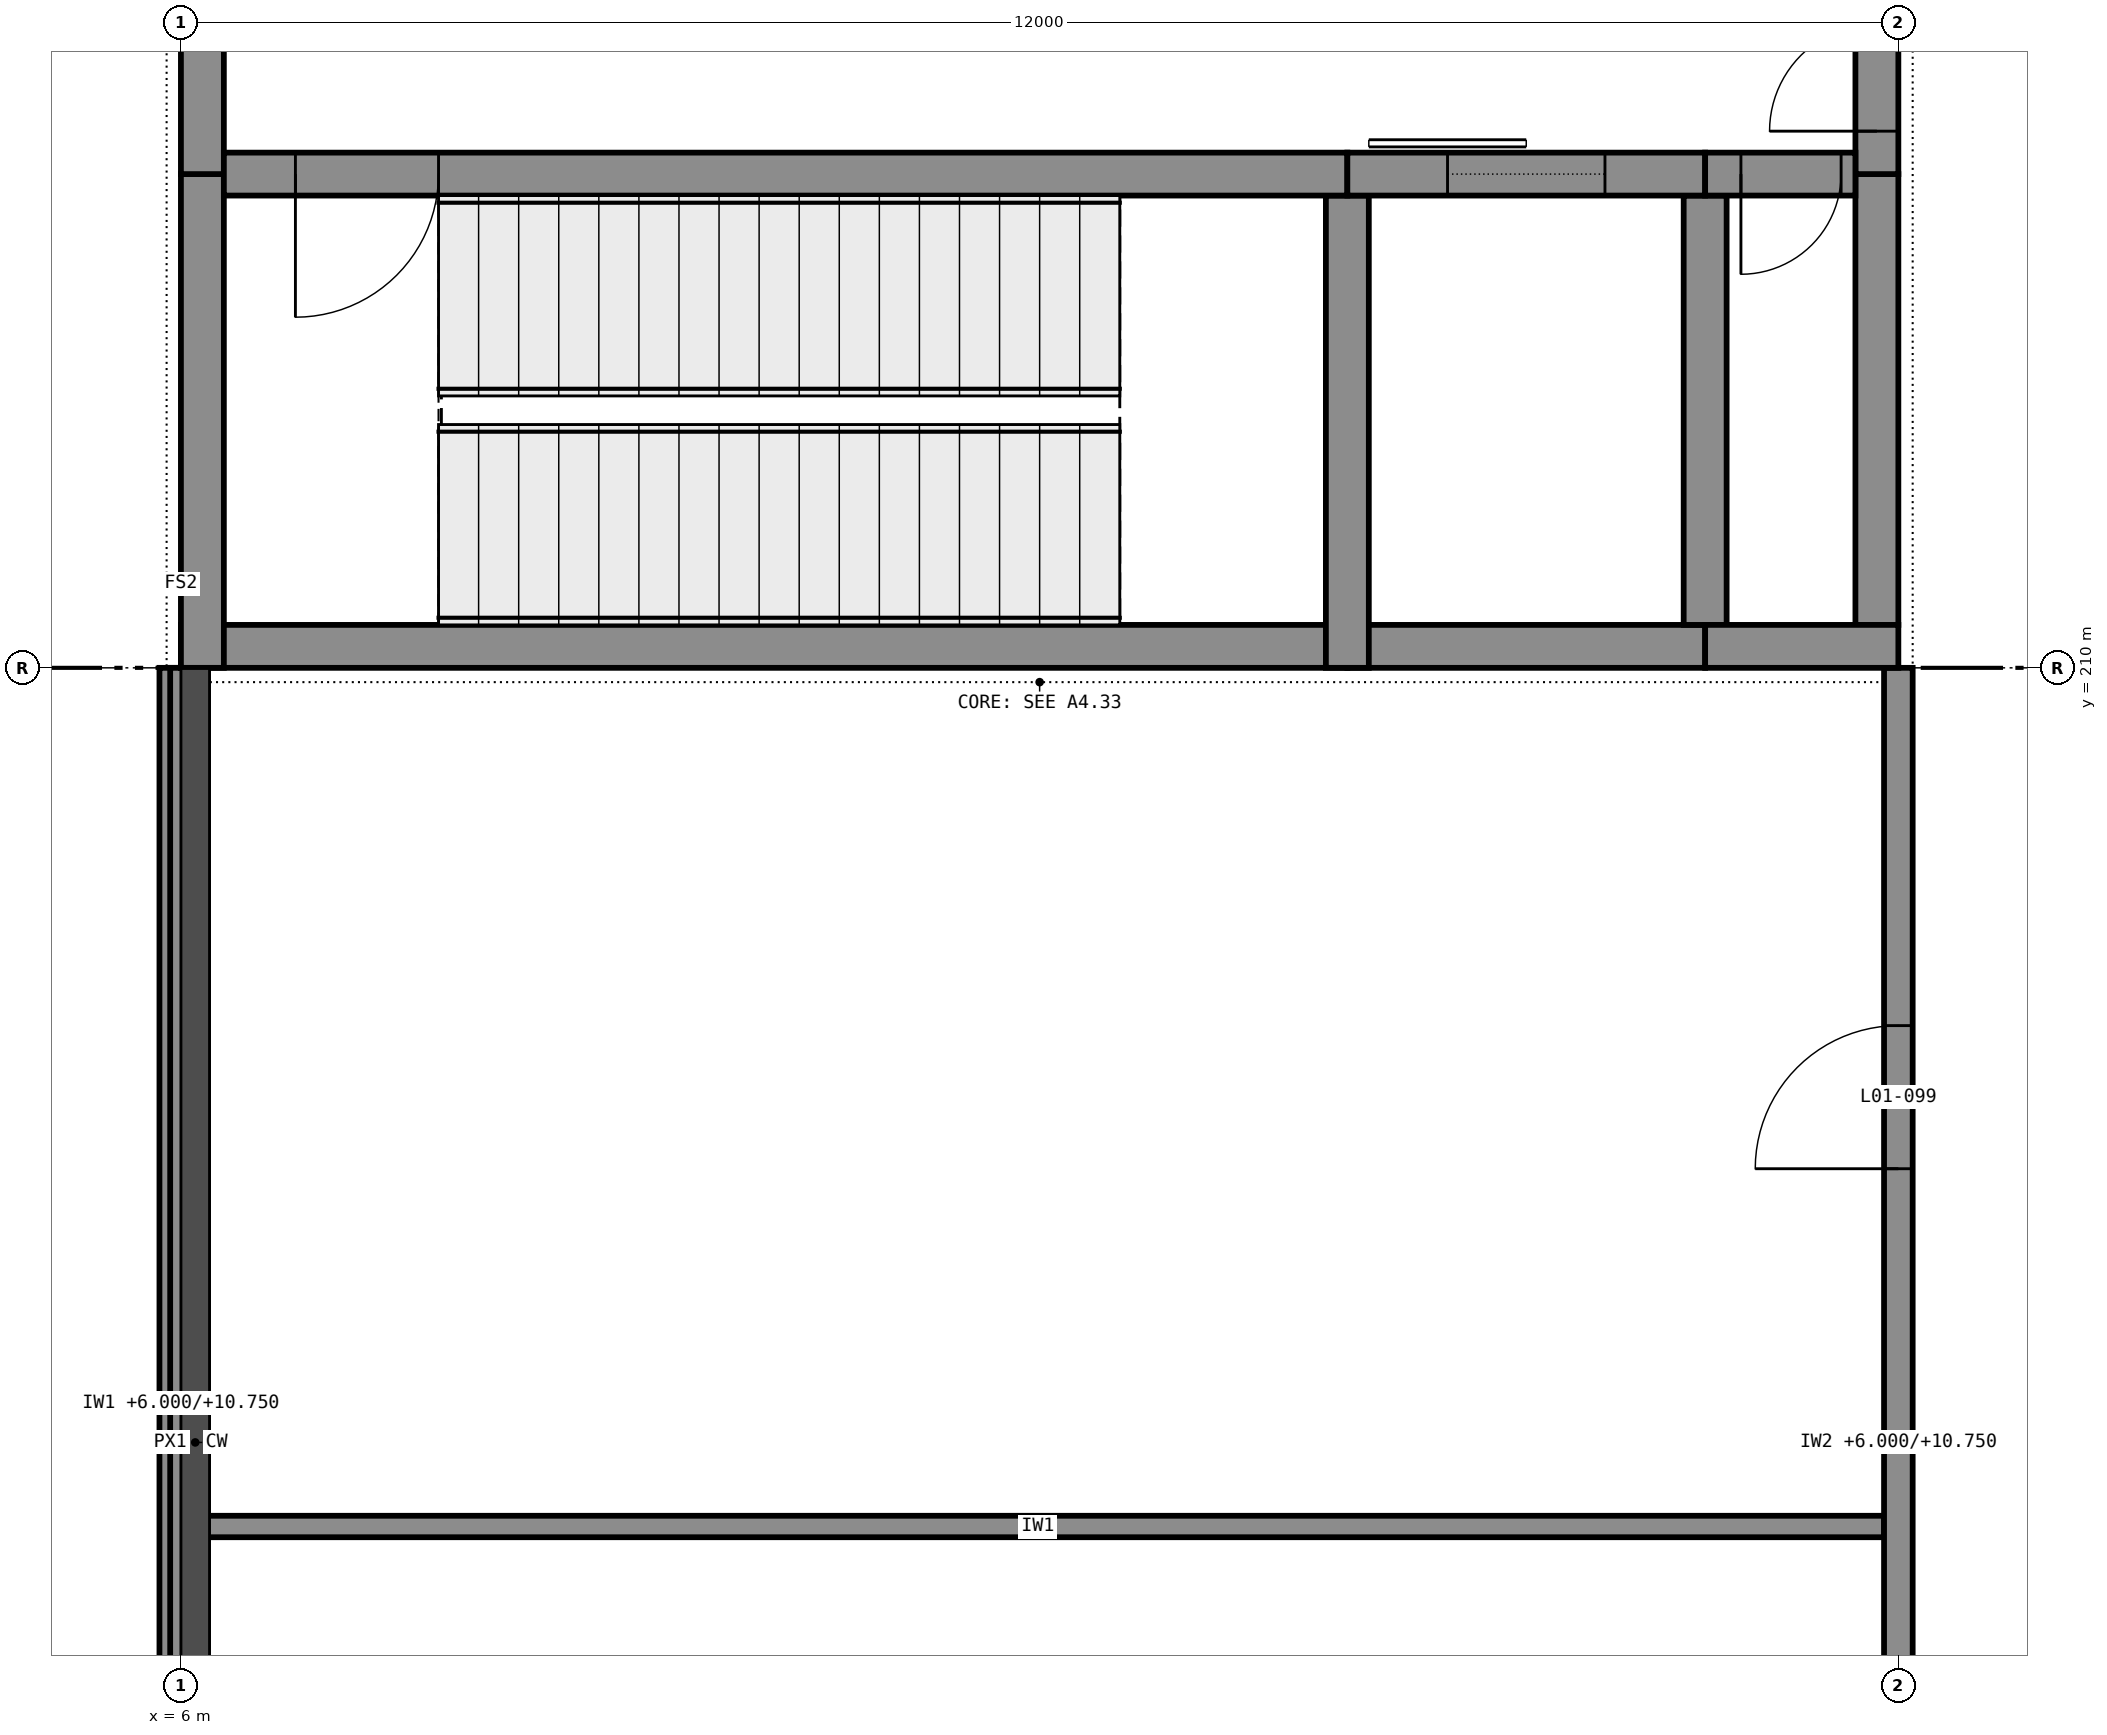
"""IFC4 building model, lengths in metres.
Left out: names, types, materials, properties, quantities, classifications, styles, units other than length and angle.
Written with IfcOpenShell. Run it as: python <this file> out.ifc"""

import sys

from ifc_helpers import new_model, si_unit, direction, frame, frame_2d, origin, place, context, subcontext, project, spatial, rectangle, extrude, element, fill, save


model = new_model("IFC4")
c1 = context("Model", 3, precision=1e-05, world=origin(), true_north=direction((0.0, 1.0)))
c2 = subcontext(c1, "Body", "Model", "MODEL_VIEW")
j1 = project(units=[si_unit("LENGTHUNIT", "METRE"), si_unit("PLANEANGLEUNIT", "RADIAN")], contexts=[c1])
p1 = place(None, origin())
s1 = spatial("IfcSite", under=j1, at=p1, CompositionType="ELEMENT")
p2 = place(p1, origin())
s2 = spatial("IfcBuilding", under=s1, at=p2, CompositionType="ELEMENT")
p3 = place(p2, frame((0.0, 0.0, 6.0)))
s3 = spatial("IfcBuildingStorey", under=s2, at=p3, CompositionType="ELEMENT", Elevation=6.0)
p4 = place(p3, frame((6.0, 210.15, 0.0), z_axis=(0.0, 0.0, 1.0), x_axis=(1.0, 0.0, 0.0)))
e1 = element("IfcWall", 1, at=p4, inside=s3, PredefinedType="SHEAR", context=c2, shape_type="SweptSolid", body=[
    extrude(rectangle(XDim=8.15, YDim=0.3, at=frame_2d((4.075, 0.0))), origin(), (0.0, 0.0, 1.0), 5.75),
])
p5 = place(p3, frame((14.15, 210.15, 0.0), z_axis=(0.0, 0.0, 1.0), x_axis=(1.0, 0.0, 0.0)))
e2 = element("IfcWall", 2, at=p5, inside=s3, PredefinedType="SHEAR", context=c2, shape_type="SweptSolid", body=[
    extrude(rectangle(XDim=2.5, YDim=0.3, at=frame_2d((1.25, 0.0))), origin(), (0.0, 0.0, 1.0), 5.75),
])
p6 = place(p3, frame((16.65, 210.15, 0.0), z_axis=(0.0, 0.0, 1.0), x_axis=(1.0, 0.0, 0.0)))
e3 = element("IfcWall", 3, at=p6, inside=s3, PredefinedType="SHEAR", context=c2, shape_type="SweptSolid", body=[
    extrude(rectangle(XDim=1.35, YDim=0.3, at=frame_2d((0.675, 0.0))), origin(), (0.0, 0.0, 1.0), 5.75),
])
p7 = place(p3, frame((6.3, 213.45, 0.0), z_axis=(0.0, 0.0, 1.0), x_axis=(1.0, 0.0, 0.0)))
e4 = element("IfcWall", 4, at=p7, inside=s3, PredefinedType="SHEAR", context=c2, shape_type="SweptSolid", body=[
    extrude(rectangle(XDim=7.85, YDim=0.3, at=frame_2d((3.925, 0.0))), origin(), (0.0, 0.0, 1.0), 5.75),
])
p8 = place(p7, frame((0.5, 0.0, 0.0)))
e5 = element("IfcOpeningElement", 5, at=p8, cuts=e4, PredefinedType="OPENING", context=c2, shape_type="SweptSolid", body=[
    extrude(rectangle(XDim=1.0, YDim=2.1, at=frame_2d((0.5, 1.05))), frame((0.0, 0.16, 0.0), z_axis=(0.0, -1.0, 0.0), x_axis=(1.0, 0.0, 0.0)), (0.0, 0.0, 1.0), 0.32),
])
p9 = place(p3, frame((14.15, 213.45, 0.0), z_axis=(0.0, 0.0, 1.0), x_axis=(1.0, 0.0, 0.0)))
e6 = element("IfcWall", 6, at=p9, inside=s3, PredefinedType="SHEAR", context=c2, shape_type="SweptSolid", body=[
    extrude(rectangle(XDim=2.5, YDim=0.3, at=frame_2d((1.25, 0.0))), origin(), (0.0, 0.0, 1.0), 5.75),
])
p10 = place(p9, frame((0.7, 0.0, 0.0)))
e7 = element("IfcOpeningElement", 7, at=p10, cuts=e6, PredefinedType="OPENING", context=c2, shape_type="SweptSolid", body=[
    extrude(rectangle(XDim=1.1, YDim=2.1, at=frame_2d((0.55, 1.05))), frame((0.0, 0.16, 0.0), z_axis=(0.0, -1.0, 0.0), x_axis=(1.0, 0.0, 0.0)), (0.0, 0.0, 1.0), 0.32),
])
p11 = place(p3, frame((16.65, 213.45, 0.0), z_axis=(0.0, 0.0, 1.0), x_axis=(1.0, 0.0, 0.0)))
e8 = element("IfcWall", 8, at=p11, inside=s3, PredefinedType="SHEAR", context=c2, shape_type="SweptSolid", body=[
    extrude(rectangle(XDim=1.05, YDim=0.3, at=frame_2d((0.525, 0.0))), origin(), (0.0, 0.0, 1.0), 5.75),
])
p12 = place(p11, frame((0.25, 0.0, 0.0)))
e9 = element("IfcOpeningElement", 9, at=p12, cuts=e8, PredefinedType="OPENING", context=c2, shape_type="SweptSolid", body=[
    extrude(rectangle(XDim=0.7, YDim=2.1, at=frame_2d((0.35, 1.05))), frame((0.0, 0.16, 0.0), z_axis=(0.0, -1.0, 0.0), x_axis=(1.0, 0.0, 0.0)), (0.0, 0.0, 1.0), 0.32),
])
p13 = place(p3, frame((6.15, 210.0, 0.0), z_axis=(0.0, 0.0, 1.0), x_axis=(0.0, 1.0, 0.0)))
e10 = element("IfcWall", 10, at=p13, inside=s3, PredefinedType="SHEAR", context=c2, shape_type="SweptSolid", body=[
    extrude(rectangle(XDim=3.45, YDim=0.3, at=frame_2d((1.725, 0.0))), origin(), (0.0, 0.0, 1.0), 5.75),
])
p14 = place(p3, frame((6.15, 213.45, 0.0), z_axis=(0.0, 0.0, 1.0), x_axis=(0.0, 1.0, 0.0)))
e11 = element("IfcWall", 11, at=p14, inside=s3, PredefinedType="SHEAR", context=c2, shape_type="SweptSolid", body=[
    extrude(rectangle(XDim=5.1, YDim=0.3, at=frame_2d((2.55, 0.0))), origin(), (0.0, 0.0, 1.0), 5.75),
])
p15 = place(p3, frame((17.85, 210.3, 0.0), z_axis=(0.0, 0.0, 1.0), x_axis=(0.0, 1.0, 0.0)))
e12 = element("IfcWall", 12, at=p15, inside=s3, PredefinedType="SHEAR", context=c2, shape_type="SweptSolid", body=[
    extrude(rectangle(XDim=3.15, YDim=0.3, at=frame_2d((1.575, 0.0))), origin(), (0.0, 0.0, 1.0), 5.75),
])
p16 = place(p3, frame((17.85, 213.45, 0.0), z_axis=(0.0, 0.0, 1.0), x_axis=(0.0, 1.0, 0.0)))
e13 = element("IfcWall", 13, at=p16, inside=s3, PredefinedType="SHEAR", context=c2, shape_type="SweptSolid", body=[
    extrude(rectangle(XDim=5.1, YDim=0.3, at=frame_2d((2.55, 0.0))), origin(), (0.0, 0.0, 1.0), 5.75),
])
p17 = place(p16, frame((0.3, 0.0, 0.0)))
e14 = element("IfcOpeningElement", 14, at=p17, cuts=e13, PredefinedType="OPENING", context=c2, shape_type="SweptSolid", body=[
    extrude(rectangle(XDim=1.5, YDim=2.1, at=frame_2d((0.75, 1.05))), frame((0.0, 0.16, 0.0), z_axis=(0.0, -1.0, 0.0), x_axis=(1.0, 0.0, 0.0)), (0.0, 0.0, 1.0), 0.32),
])
p18 = place(p3, frame((14.15, 210.0, 0.0), z_axis=(0.0, 0.0, 1.0), x_axis=(0.0, 1.0, 0.0)))
e15 = element("IfcWall", 15, at=p18, inside=s3, PredefinedType="SHEAR", context=c2, shape_type="SweptSolid", body=[
    extrude(rectangle(XDim=3.3, YDim=0.3, at=frame_2d((1.65, 0.0))), origin(), (0.0, 0.0, 1.0), 5.75),
])
p19 = place(p3, frame((16.65, 210.3, 0.0), z_axis=(0.0, 0.0, 1.0), x_axis=(0.0, 1.0, 0.0)))
e16 = element("IfcWall", 16, at=p19, inside=s3, PredefinedType="SHEAR", context=c2, shape_type="SweptSolid", body=[
    extrude(rectangle(XDim=3.0, YDim=0.3, at=frame_2d((1.5, 0.0))), origin(), (0.0, 0.0, 1.0), 5.75),
])
p20 = place(p3, frame((5.925, 210.0, 5.75), z_axis=(0.0, 0.0, 1.0), x_axis=(0.0, -1.0, 0.0)))
e17 = element("IfcWall", 17, at=p20, inside=s3, PredefinedType="STANDARD", context=c2, shape_type="SweptSolid", body=[
    extrude(rectangle(XDim=11.5, YDim=0.15, at=frame_2d((5.75, 0.0))), origin(), (0.0, 0.0, 1.0), 0.25),
])
p21 = place(p3, frame((6.075, 204.0, 0.0), z_axis=(0.0, 0.0, 1.0), x_axis=(1.0, 0.0, 0.0)))
e18 = element("IfcWall", 18, at=p21, inside=s3, PredefinedType="PARTITIONING", context=c2, shape_type="SweptSolid", body=[
    extrude(rectangle(XDim=11.825, YDim=0.15, at=frame_2d((5.913, 0.0))), origin(), (0.0, 0.0, 1.0), 5.75),
])
p22 = place(p3, frame((6.0, 186.1, 0.0), z_axis=(0.0, 0.0, 1.0), x_axis=(0.0, 1.0, 0.0)))
e19 = element("IfcWall", 19, at=p22, inside=s3, PredefinedType="PARTITIONING", context=c2, shape_type="SweptSolid", body=[
    extrude(rectangle(XDim=23.9, YDim=0.15, at=frame_2d((11.95, 0.0))), origin(), (0.0, 0.0, 1.0), 4.75),
])
p23 = place(p3, frame((18.0, 162.0, 0.0), z_axis=(0.0, 0.0, 1.0), x_axis=(0.0, 1.0, 0.0)))
e20 = element("IfcWall", 20, at=p23, inside=s3, PredefinedType="PARTITIONING", context=c2, shape_type="SweptSolid", body=[
    extrude(rectangle(XDim=48.0, YDim=0.2, at=frame_2d((24.0, 0.0))), origin(), (0.0, 0.0, 1.0), 4.75),
])
p24 = place(p23, frame((2.5, 0.0, 0.0)))
e21 = element("IfcOpeningElement", 21, at=p24, cuts=e20, PredefinedType="OPENING", context=c2, shape_type="SweptSolid", body=[
    extrude(rectangle(XDim=1.0, YDim=2.1, at=frame_2d((0.5, 1.05))), frame((0.0, 0.11, 0.0), z_axis=(0.0, -1.0, 0.0), x_axis=(1.0, 0.0, 0.0)), (0.0, 0.0, 1.0), 0.22),
])
p25 = place(p23, frame((8.5, 0.0, 0.0)))
e22 = element("IfcOpeningElement", 22, at=p25, cuts=e20, PredefinedType="OPENING", context=c2, shape_type="SweptSolid", body=[
    extrude(rectangle(XDim=1.0, YDim=2.1, at=frame_2d((0.5, 1.05))), frame((0.0, 0.11, 0.0), z_axis=(0.0, -1.0, 0.0), x_axis=(1.0, 0.0, 0.0)), (0.0, 0.0, 1.0), 0.22),
])
p26 = place(p23, frame((14.5, 0.0, 0.0)))
e23 = element("IfcOpeningElement", 23, at=p26, cuts=e20, PredefinedType="OPENING", context=c2, shape_type="SweptSolid", body=[
    extrude(rectangle(XDim=1.0, YDim=2.1, at=frame_2d((0.5, 1.05))), frame((0.0, 0.11, 0.0), z_axis=(0.0, -1.0, 0.0), x_axis=(1.0, 0.0, 0.0)), (0.0, 0.0, 1.0), 0.22),
])
p27 = place(p23, frame((19.2, 0.0, 0.0)))
e24 = element("IfcOpeningElement", 24, at=p27, cuts=e20, PredefinedType="OPENING", context=c2, shape_type="SweptSolid", body=[
    extrude(rectangle(XDim=1.2, YDim=2.1, at=frame_2d((0.6, 1.05))), frame((0.0, 0.11, 0.0), z_axis=(0.0, -1.0, 0.0), x_axis=(1.0, 0.0, 0.0)), (0.0, 0.0, 1.0), 0.22),
])
p28 = place(p23, frame((26.5, 0.0, 0.0)))
e25 = element("IfcOpeningElement", 25, at=p28, cuts=e20, PredefinedType="OPENING", context=c2, shape_type="SweptSolid", body=[
    extrude(rectangle(XDim=1.0, YDim=2.1, at=frame_2d((0.5, 1.05))), frame((0.0, 0.11, 0.0), z_axis=(0.0, -1.0, 0.0), x_axis=(1.0, 0.0, 0.0)), (0.0, 0.0, 1.0), 0.22),
])
p29 = place(p23, frame((32.5, 0.0, 0.0)))
e26 = element("IfcOpeningElement", 26, at=p29, cuts=e20, PredefinedType="OPENING", context=c2, shape_type="SweptSolid", body=[
    extrude(rectangle(XDim=1.0, YDim=2.1, at=frame_2d((0.5, 1.05))), frame((0.0, 0.11, 0.0), z_axis=(0.0, -1.0, 0.0), x_axis=(1.0, 0.0, 0.0)), (0.0, 0.0, 1.0), 0.22),
])
p30 = place(p23, frame((38.5, 0.0, 0.0)))
e27 = element("IfcOpeningElement", 27, at=p30, cuts=e20, PredefinedType="OPENING", context=c2, shape_type="SweptSolid", body=[
    extrude(rectangle(XDim=1.0, YDim=2.1, at=frame_2d((0.5, 1.05))), frame((0.0, 0.11, 0.0), z_axis=(0.0, -1.0, 0.0), x_axis=(1.0, 0.0, 0.0)), (0.0, 0.0, 1.0), 0.22),
])
p31 = place(p23, frame((44.5, 0.0, 0.0)))
e28 = element("IfcOpeningElement", 28, at=p31, cuts=e20, PredefinedType="OPENING", context=c2, shape_type="SweptSolid", body=[
    extrude(rectangle(XDim=1.0, YDim=2.1, at=frame_2d((0.5, 1.05))), frame((0.0, 0.11, 0.0), z_axis=(0.0, -1.0, 0.0), x_axis=(1.0, 0.0, 0.0)), (0.0, 0.0, 1.0), 0.22),
])
p32 = place(p31, origin())
e29 = element("IfcDoor", 29, at=p32, inside=s3, OperationType="SINGLE_SWING_RIGHT", PredefinedType="DOOR", context=c2, shape_type="SweptSolid", body=[
    extrude(rectangle(XDim=1.0, YDim=2.1, at=frame_2d((0.5, 1.05))), frame((0.0, 0.025, 0.0), z_axis=(0.0, -1.0, 0.0), x_axis=(1.0, 0.0, 0.0)), (0.0, 0.0, 1.0), 0.05),
])
fill(e28, e29)
p33 = place(p8, frame((1.0, 0.0, 0.0), z_axis=(0.0, 0.0, 1.0), x_axis=(-1.0, 0.0, 0.0)))
e30 = element("IfcDoor", 30, at=p33, inside=s3, OperationType="SINGLE_SWING_LEFT", PredefinedType="DOOR", context=c2, shape_type="SweptSolid", body=[
    extrude(rectangle(XDim=1.0, YDim=2.1, at=frame_2d((0.5, 1.05))), frame((0.0, 0.025, 0.0), z_axis=(0.0, -1.0, 0.0), x_axis=(1.0, 0.0, 0.0)), (0.0, 0.0, 1.0), 0.05),
])
fill(e5, e30)
p34 = place(p10, origin())
e31 = element("IfcDoor", 31, at=p34, inside=s3, OperationType="SLIDING_TO_LEFT", PredefinedType="DOOR", context=c2, shape_type="SweptSolid", body=[
    extrude(rectangle(XDim=1.1, YDim=2.1, at=frame_2d((0.55, 1.05))), frame((0.0, 0.025, 0.0), z_axis=(0.0, -1.0, 0.0), x_axis=(1.0, 0.0, 0.0)), (0.0, 0.0, 1.0), 0.05),
])
fill(e7, e31)
p35 = place(p12, frame((0.7, 0.0, 0.0), z_axis=(0.0, 0.0, 1.0), x_axis=(-1.0, 0.0, 0.0)))
e32 = element("IfcDoor", 32, at=p35, inside=s3, OperationType="SINGLE_SWING_LEFT", PredefinedType="DOOR", context=c2, shape_type="SweptSolid", body=[
    extrude(rectangle(XDim=0.7, YDim=2.1, at=frame_2d((0.35, 1.05))), frame((0.0, 0.025, 0.0), z_axis=(0.0, -1.0, 0.0), x_axis=(1.0, 0.0, 0.0)), (0.0, 0.0, 1.0), 0.05),
])
fill(e9, e32)
p36 = place(p17, origin())
e33 = element("IfcDoor", 33, at=p36, inside=s3, OperationType="DOUBLE_DOOR_SINGLE_SWING", PredefinedType="DOOR", context=c2, shape_type="SweptSolid", body=[
    extrude(rectangle(XDim=1.5, YDim=2.1, at=frame_2d((0.75, 1.05))), frame((0.0, 0.025, 0.0), z_axis=(0.0, -1.0, 0.0), x_axis=(1.0, 0.0, 0.0)), (0.0, 0.0, 1.0), 0.05),
])
fill(e14, e33)
save(model, sys.argv[1])
